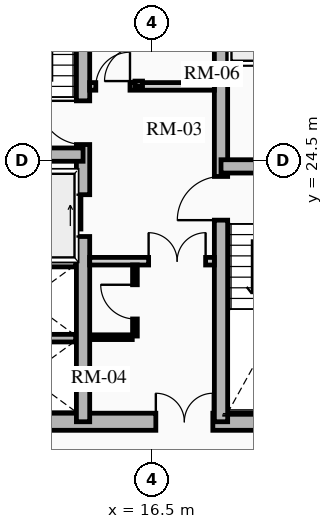
"""IFC4 building model, lengths in metres.
Left out: names, types, materials, properties, quantities, classifications, styles, units other than length and angle.
Written with IfcOpenShell. Run it as: python <this file> out.ifc"""

import sys

from ifc_helpers import new_model, si_unit, direction, frame, frame_2d, origin, place, context, subcontext, project, spatial, rectangle, extrude, source, transform, mapped, element, fill, save


model = new_model("IFC4")
c1 = context("Model", 3, precision=1e-05, world=origin(), true_north=direction((0.0, 1.0)))
c2 = subcontext(c1, "Body", "Model", "MODEL_VIEW")
j1 = project(units=[si_unit("LENGTHUNIT", "METRE"), si_unit("PLANEANGLEUNIT", "RADIAN")], contexts=[c1])
p1 = place(None, origin())
s1 = spatial("IfcSite", under=j1, at=p1, CompositionType="ELEMENT")
p2 = place(p1, origin())
s2 = spatial("IfcBuilding", under=s1, at=p2, CompositionType="ELEMENT")
p3 = place(p2, frame((0.0, 0.0, 110.89)))
s3 = spatial("IfcBuildingStorey", under=s2, at=p3, CompositionType="ELEMENT", Elevation=110.89)
p4 = place(p3, frame((11.15, 17.625, 0.0), z_axis=(0.0, 0.0, 1.0), x_axis=(1.0, 0.0, 0.0)))
e1 = element("IfcWall", 1, at=p4, inside=s3, PredefinedType="SHEAR", context=c2, shape_type="SweptSolid", body=[
    extrude(rectangle(XDim=10.7, YDim=0.45, at=frame_2d((5.35, 0.0))), origin(), (0.0, 0.0, 1.0), 2.91),
])
m1 = source(origin(), c2, "Body", "SweptSolid", [
    extrude(rectangle(XDim=1.5, YDim=2.02, at=frame_2d((0.75, 1.01))), frame((0.0, 0.235, 0.0), z_axis=(0.0, -1.0, 0.0), x_axis=(1.0, 0.0, 0.0)), (0.0, 0.0, 1.0), 0.47),
])
p5 = place(p4, frame((5.45, 0.0, 0.0)))
e2 = element("IfcOpeningElement", 2, at=p5, cuts=e1, PredefinedType="OPENING", context=c2, shape_type="MappedRepresentation", body=[
    mapped(m1, transform((0.0, 0.0, 0.0), x_axis=(1.0, 0.0, 0.0), y_axis=(0.0, 1.0, 0.0), z_axis=(0.0, 0.0, 1.0), scale=1.0)),
])
p6 = place(p3, frame((14.685, 17.625, 0.0), z_axis=(0.0, 0.0, 1.0), x_axis=(0.0, 1.0, 0.0)))
e3 = element("IfcWall", 3, at=p6, inside=s3, PredefinedType="SHEAR", context=c2, shape_type="SweptSolid", body=[
    extrude(rectangle(XDim=13.75, YDim=0.35, at=frame_2d((6.875, 0.0))), origin(), (0.0, 0.0, 1.0), 2.91),
])
m2 = source(origin(), c2, "Body", "SweptSolid", [
    extrude(rectangle(XDim=1.1, YDim=2.015, at=frame_2d((0.55, 1.007))), frame((0.0, 0.185, 0.0), z_axis=(0.0, -1.0, 0.0), x_axis=(1.0, 0.0, 0.0)), (0.0, 0.0, 1.0), 0.37),
])
p7 = place(p6, frame((4.875, 0.0, 0.0)))
e4 = element("IfcOpeningElement", 4, at=p7, cuts=e3, PredefinedType="OPENING", context=c2, shape_type="MappedRepresentation", body=[
    mapped(m2, transform((0.0, 0.0, 0.0), x_axis=(1.0, 0.0, 0.0), y_axis=(0.0, 1.0, 0.0), z_axis=(0.0, 0.0, 1.0), scale=1.0)),
])
m3 = source(origin(), c2, "Body", "SweptSolid", [
    extrude(rectangle(XDim=1.15, YDim=2.02, at=frame_2d((0.575, 1.01))), frame((0.0, 0.185, 0.0), z_axis=(0.0, -1.0, 0.0), x_axis=(1.0, 0.0, 0.0)), (0.0, 0.0, 1.0), 0.37),
])
p8 = place(p6, frame((7.295, 0.0, 0.0)))
e5 = element("IfcOpeningElement", 5, at=p8, cuts=e3, PredefinedType="OPENING", context=c2, shape_type="MappedRepresentation", body=[
    mapped(m3, transform((0.0, 0.0, 0.0), x_axis=(1.0, 0.0, 0.0), y_axis=(0.0, 1.0, 0.0), z_axis=(0.0, 0.0, 1.0), scale=1.0)),
])
p9 = place(p3, frame((18.315, 17.625, 0.0), z_axis=(0.0, 0.0, 1.0), x_axis=(0.0, 1.0, 0.0)))
e6 = element("IfcWall", 6, at=p9, inside=s3, PredefinedType="SHEAR", context=c2, shape_type="SweptSolid", body=[
    extrude(rectangle(XDim=13.75, YDim=0.35, at=frame_2d((6.875, 0.0))), origin(), (0.0, 0.0, 1.0), 2.91),
])
p10 = place(p9, frame((10.0, 0.0, 0.0)))
e7 = element("IfcOpeningElement", 7, at=p10, cuts=e6, PredefinedType="OPENING", context=c2, shape_type="MappedRepresentation", body=[
    mapped(m2, transform((0.0, 0.0, 0.0), x_axis=(1.0, 0.0, 0.0), y_axis=(0.0, 1.0, 0.0), z_axis=(0.0, 0.0, 1.0), scale=1.0)),
])
p11 = place(p9, frame((12.0, 0.0, 0.0)))
e8 = element("IfcOpeningElement", 8, at=p11, cuts=e6, PredefinedType="OPENING", context=c2, shape_type="MappedRepresentation", body=[
    mapped(m2, transform((0.0, 0.0, 0.0), x_axis=(1.0, 0.0, 0.0), y_axis=(0.0, 1.0, 0.0), z_axis=(0.0, 0.0, 1.0), scale=1.0)),
])
p12 = place(p9, frame((5.305, 0.0, 0.0)))
e9 = element("IfcOpeningElement", 9, at=p12, cuts=e6, PredefinedType="OPENING", context=c2, shape_type="MappedRepresentation", body=[
    mapped(m3, transform((0.0, 0.0, 0.0), x_axis=(1.0, 0.0, 0.0), y_axis=(0.0, 1.0, 0.0), z_axis=(0.0, 0.0, 1.0), scale=1.0)),
])
for number, where, z_axis, x_axis in (
    (10, (11.4, 24.655, 0.0), (0.0, 0.0, 1.0), (1.0, 0.0, 0.0)),
    (11, (18.315, 24.345, 0.0), (0.0, 0.0, 1.0), (1.0, 0.0, 0.0)),
):
    element("IfcWall", number, at=place(p3, frame(where, z_axis=z_axis, x_axis=x_axis)), inside=s3, PredefinedType="SHEAR", context=c2, shape_type="SweptSolid", body=[
        extrude(rectangle(XDim=3.285, YDim=0.35, at=frame_2d((1.643, 0.0))), origin(), (0.0, 0.0, 1.0), 2.91),
    ])
for number, where, z_axis, x_axis in (
    (12, (11.52, 21.8, 0.0), (0.0, 0.0, 1.0), (1.0, 0.0, 0.0)),
    (13, (11.52, 19.825, 0.0), (0.0, 0.0, 1.0), (1.0, 0.0, 0.0)),
    (14, (18.51, 27.13, 0.0), (0.0, 0.0, 1.0), (1.0, 0.0, 0.0)),
):
    element("IfcWall", number, at=place(p3, frame(where, z_axis=z_axis, x_axis=x_axis)), inside=s3, PredefinedType="SHEAR", context=c2, shape_type="SweptSolid", body=[
        extrude(rectangle(XDim=2.97, YDim=0.2, at=frame_2d((1.485, 0.0))), origin(), (0.0, 0.0, 1.0), 2.91),
    ])
p13 = place(p3, frame((14.86, 21.85, 0.0), z_axis=(0.0, 0.0, 1.0), x_axis=(1.0, 0.0, 0.0)))
e15 = element("IfcWall", 15, at=p13, inside=s3, PredefinedType="PARTITIONING", context=c2, shape_type="SweptSolid", body=[
    extrude(rectangle(XDim=3.28, YDim=0.2, at=frame_2d((1.64, 0.0))), origin(), (0.0, 0.0, 1.0), 2.655),
])
m4 = source(origin(), c2, "Body", "SweptSolid", [
    extrude(rectangle(XDim=1.5, YDim=2.02, at=frame_2d((0.75, 1.01))), frame((0.0, 0.11, 0.0), z_axis=(0.0, -1.0, 0.0), x_axis=(1.0, 0.0, 0.0)), (0.0, 0.0, 1.0), 0.22),
])
p14 = place(p13, frame((1.55, 0.0, 0.0)))
e16 = element("IfcOpeningElement", 16, at=p14, cuts=e15, PredefinedType="OPENING", context=c2, shape_type="MappedRepresentation", body=[
    mapped(m4, transform((0.0, 0.0, 0.0), x_axis=(1.0, 0.0, 0.0), y_axis=(0.0, 1.0, 0.0), z_axis=(0.0, 0.0, 1.0), scale=1.0)),
])
p15 = place(p3, frame((14.86, 26.45, 0.0), z_axis=(0.0, 0.0, 1.0), x_axis=(1.0, 0.0, 0.0)))
e17 = element("IfcWall", 17, at=p15, inside=s3, PredefinedType="PARTITIONING", context=c2, shape_type="SweptSolid", body=[
    extrude(rectangle(XDim=3.28, YDim=0.2, at=frame_2d((1.64, 0.0))), origin(), (0.0, 0.0, 1.0), 2.655),
])
m5 = source(origin(), c2, "Body", "SweptSolid", [
    extrude(rectangle(XDim=0.9, YDim=2.005, at=frame_2d((0.45, 1.002))), frame((0.0, 0.11, 0.0), z_axis=(0.0, -1.0, 0.0), x_axis=(1.0, 0.0, 0.0)), (0.0, 0.0, 1.0), 0.22),
])
p16 = place(p15, frame((0.16, 0.0, 0.0)))
e18 = element("IfcOpeningElement", 18, at=p16, cuts=e17, PredefinedType="OPENING", context=c2, shape_type="MappedRepresentation", body=[
    mapped(m5, transform((0.0, 0.0, 0.0), x_axis=(1.0, 0.0, 0.0), y_axis=(0.0, 1.0, 0.0), z_axis=(0.0, 0.0, 1.0), scale=1.0)),
])
p17 = place(p3, frame((16.15, 26.45, 0.0), z_axis=(0.0, 0.0, 1.0), x_axis=(0.0, 1.0, 0.0)))
e19 = element("IfcWall", 19, at=p17, inside=s3, PredefinedType="PARTITIONING", context=c2, shape_type="SweptSolid", body=[
    extrude(rectangle(XDim=2.4, YDim=0.2, at=frame_2d((1.2, 0.0))), origin(), (0.0, 0.0, 1.0), 2.655),
])
p18 = place(p17, frame((0.14, 0.0, 0.0)))
e20 = element("IfcOpeningElement", 20, at=p18, cuts=e19, PredefinedType="OPENING", context=c2, shape_type="MappedRepresentation", body=[
    mapped(m5, transform((0.0, 0.0, 0.0), x_axis=(1.0, 0.0, 0.0), y_axis=(0.0, 1.0, 0.0), z_axis=(0.0, 0.0, 1.0), scale=1.0)),
])
p19 = place(p3, frame((16.05, 19.88, 0.0), z_axis=(0.0, 0.0, 1.0), x_axis=(0.0, 1.0, 0.0)))
e21 = element("IfcWall", 21, at=p19, inside=s3, PredefinedType="PARTITIONING", context=c2, shape_type="SweptSolid", body=[
    extrude(rectangle(XDim=1.87, YDim=0.125, at=frame_2d((0.935, 0.0))), origin(), (0.0, 0.0, 1.0), 2.655),
])
m6 = source(origin(), c2, "Body", "SweptSolid", [
    extrude(rectangle(XDim=0.9, YDim=2.005, at=frame_2d((0.45, 1.002))), frame((0.0, 0.073, 0.0), z_axis=(0.0, -1.0, 0.0), x_axis=(1.0, 0.0, 0.0)), (0.0, 0.0, 1.0), 0.145),
])
p20 = place(p19, frame((0.45, 0.0, 0.0)))
e22 = element("IfcOpeningElement", 22, at=p20, cuts=e21, PredefinedType="OPENING", context=c2, shape_type="MappedRepresentation", body=[
    mapped(m6, transform((0.0, 0.0, 0.0), x_axis=(1.0, 0.0, 0.0), y_axis=(0.0, 1.0, 0.0), z_axis=(0.0, 0.0, 1.0), scale=1.0)),
])
p21 = place(p3, frame((14.88, 19.85, 0.0), z_axis=(0.0, 0.0, 1.0), x_axis=(1.0, 0.0, 0.0)))
e23 = element("IfcWall", 23, at=p21, inside=s3, PredefinedType="PARTITIONING", context=c2, shape_type="SweptSolid", body=[
    extrude(rectangle(XDim=1.1, YDim=0.125, at=frame_2d((0.55, 0.0))), origin(), (0.0, 0.0, 1.0), 2.655),
])
m7 = source(origin(), c2, "Body", "SweptSolid", [
    extrude(rectangle(XDim=1.1, YDim=2.015, at=frame_2d((0.55, 1.007))), frame((0.0, 0.025, 0.0), z_axis=(0.0, -1.0, 0.0), x_axis=(1.0, 0.0, 0.0)), (0.0, 0.0, 1.0), 0.05),
])
p22 = place(p7, origin())
e24 = element("IfcDoor", 24, at=p22, inside=s3, OperationType="SLIDING_TO_RIGHT", PredefinedType="DOOR", context=c2, shape_type="MappedRepresentation", body=[
    mapped(m7, transform((0.0, 0.0, 0.0), x_axis=(1.0, 0.0, 0.0), y_axis=(0.0, 1.0, 0.0), z_axis=(0.0, 0.0, 1.0), scale=1.0)),
])
fill(e4, e24)
m8 = source(origin(), c2, "Body", "SweptSolid", [
    extrude(rectangle(XDim=1.15, YDim=2.02, at=frame_2d((0.575, 1.01))), frame((0.0, 0.025, 0.0), z_axis=(0.0, -1.0, 0.0), x_axis=(1.0, 0.0, 0.0)), (0.0, 0.0, 1.0), 0.05),
])
p23 = place(p8, origin())
e25 = element("IfcDoor", 25, at=p23, inside=s3, OperationType="SINGLE_SWING_RIGHT", PredefinedType="DOOR", context=c2, shape_type="MappedRepresentation", body=[
    mapped(m8, transform((0.0, 0.0, 0.0), x_axis=(1.0, 0.0, 0.0), y_axis=(0.0, 1.0, 0.0), z_axis=(0.0, 0.0, 1.0), scale=1.0)),
])
fill(e5, e25)
p24 = place(p12, origin())
e26 = element("IfcDoor", 26, at=p24, inside=s3, OperationType="SINGLE_SWING_LEFT", PredefinedType="DOOR", context=c2, shape_type="MappedRepresentation", body=[
    mapped(m8, transform((0.0, 0.0, 0.0), x_axis=(1.0, 0.0, 0.0), y_axis=(0.0, 1.0, 0.0), z_axis=(0.0, 0.0, 1.0), scale=1.0)),
])
fill(e9, e26)
m9 = source(origin(), c2, "Body", "SweptSolid", [
    extrude(rectangle(XDim=1.5, YDim=2.02, at=frame_2d((0.75, 1.01))), frame((0.0, 0.025, 0.0), z_axis=(0.0, -1.0, 0.0), x_axis=(1.0, 0.0, 0.0)), (0.0, 0.0, 1.0), 0.05),
])
p25 = place(p5, origin())
e27 = element("IfcDoor", 27, at=p25, inside=s3, OperationType="DOUBLE_DOOR_SINGLE_SWING", PredefinedType="DOOR", context=c2, shape_type="MappedRepresentation", body=[
    mapped(m9, transform((0.0, 0.0, 0.0), x_axis=(1.0, 0.0, 0.0), y_axis=(0.0, 1.0, 0.0), z_axis=(0.0, 0.0, 1.0), scale=1.0)),
])
fill(e2, e27)
p26 = place(p14, origin())
e28 = element("IfcDoor", 28, at=p26, inside=s3, OperationType="DOUBLE_DOOR_SINGLE_SWING", PredefinedType="DOOR", context=c2, shape_type="MappedRepresentation", body=[
    mapped(m9, transform((0.0, 0.0, 0.0), x_axis=(1.0, 0.0, 0.0), y_axis=(0.0, 1.0, 0.0), z_axis=(0.0, 0.0, 1.0), scale=1.0)),
])
fill(e16, e28)
m10 = source(origin(), c2, "Body", "SweptSolid", [
    extrude(rectangle(XDim=0.9, YDim=2.005, at=frame_2d((0.45, 1.002))), frame((0.0, 0.025, 0.0), z_axis=(0.0, -1.0, 0.0), x_axis=(1.0, 0.0, 0.0)), (0.0, 0.0, 1.0), 0.05),
])
p27 = place(p16, origin())
e29 = element("IfcDoor", 29, at=p27, inside=s3, OperationType="SINGLE_SWING_RIGHT", PredefinedType="DOOR", context=c2, shape_type="MappedRepresentation", body=[
    mapped(m10, transform((0.0, 0.0, 0.0), x_axis=(1.0, 0.0, 0.0), y_axis=(0.0, 1.0, 0.0), z_axis=(0.0, 0.0, 1.0), scale=1.0)),
])
fill(e18, e29)
p28 = place(p20, origin())
e30 = element("IfcDoor", 30, at=p28, inside=s3, OperationType="SINGLE_SWING_RIGHT", PredefinedType="DOOR", context=c2, shape_type="MappedRepresentation", body=[
    mapped(m10, transform((0.0, 0.0, 0.0), x_axis=(1.0, 0.0, 0.0), y_axis=(0.0, 1.0, 0.0), z_axis=(0.0, 0.0, 1.0), scale=1.0)),
])
fill(e22, e30)
p29 = place(p18, origin())
e31 = element("IfcDoor", 31, at=p29, inside=s3, OperationType="SINGLE_SWING_LEFT", PredefinedType="DOOR", context=c2, shape_type="MappedRepresentation", body=[
    mapped(m10, transform((0.0, 0.0, 0.0), x_axis=(1.0, 0.0, 0.0), y_axis=(0.0, 1.0, 0.0), z_axis=(0.0, 0.0, 1.0), scale=1.0)),
])
fill(e20, e31)
save(model, sys.argv[1])
